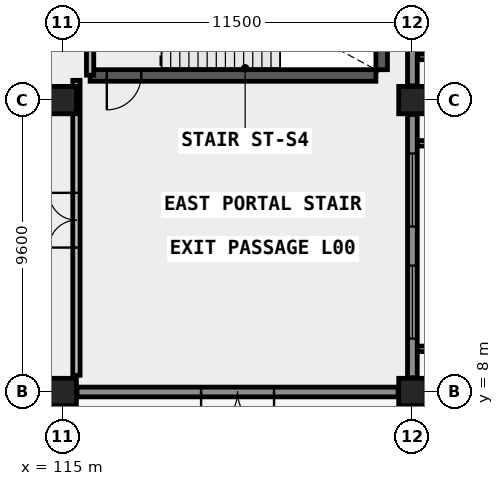
"""IFC4 building model, lengths in metres.
Left out: names, types, materials, properties, quantities, classifications, styles, units other than length and angle.
Written with IfcOpenShell. Run it as: python <this file> out.ifc"""

import sys

from ifc_helpers import new_model, si_unit, direction, frame, frame_2d, origin, origin_2d, place, context, subcontext, project, spatial, rectangle, circle, extrude, element, fill, save


model = new_model("IFC4")
c1 = context("Model", 3, precision=1e-05, world=origin(), true_north=direction((0.0, 1.0)))
c2 = subcontext(c1, "Body", "Model", "MODEL_VIEW")
j1 = project(units=[si_unit("LENGTHUNIT", "METRE"), si_unit("PLANEANGLEUNIT", "RADIAN")], contexts=[c1])
p1 = place(None, origin())
s1 = spatial("IfcSite", under=j1, at=p1, CompositionType="ELEMENT")
p2 = place(p1, origin())
s2 = spatial("IfcBuilding", under=s1, at=p2, CompositionType="ELEMENT")
p3 = place(p2, origin())
s3 = spatial("IfcBuildingStorey", under=s2, at=p3, CompositionType="ELEMENT", Elevation=0.0)
for number, where, z_axis, x_axis in (
    (1, (115.0, 8.0, 0.0), (0.0, 0.0, 1.0), (1.0, 0.0, 0.0)),
    (2, (115.0, 17.6, 0.0), (0.0, 0.0, 1.0), (1.0, 0.0, 0.0)),
    (3, (126.5, 8.0, 0.0), (0.0, 0.0, 1.0), (1.0, 0.0, 0.0)),
    (4, (126.5, 17.6, 0.0), (0.0, 0.0, 1.0), (1.0, 0.0, 0.0)),
):
    element("IfcColumn", number, at=place(p3, frame(where, z_axis=z_axis, x_axis=x_axis)), inside=s3, PredefinedType="COLUMN", context=c2, shape_type="SweptSolid", body=[
        extrude(circle(Radius=0.45, at=origin_2d()), origin(), (0.0, 0.0, 1.0), 4.2),
    ])
p4 = place(p3, frame((115.9, 18.41, 0.0), z_axis=(0.0, 0.0, 1.0), x_axis=(1.0, 0.0, 0.0)))
e5 = element("IfcWall", 5, at=p4, inside=s3, PredefinedType="SHEAR", context=c2, shape_type="SweptSolid", body=[
    extrude(rectangle(XDim=9.4, YDim=0.38, at=frame_2d((4.7, 0.0))), origin(), (0.0, 0.0, 1.0), 4.2),
])
p5 = place(p4, frame((0.55, 0.0, 0.0)))
e6 = element("IfcOpeningElement", 6, at=p5, cuts=e5, PredefinedType="OPENING", context=c2, shape_type="SweptSolid", body=[
    extrude(rectangle(XDim=1.13, YDim=2.15, at=frame_2d((0.565, 1.075))), frame((0.0, 0.2, 0.0), z_axis=(0.0, -1.0, 0.0), x_axis=(1.0, 0.0, 0.0)), (0.0, 0.0, 1.0), 0.4),
])
p6 = place(p3, frame((125.49, 18.6, 0.0), z_axis=(0.0, 0.0, 1.0), x_axis=(0.0, 1.0, 0.0)))
e7 = element("IfcWall", 7, at=p6, inside=s3, PredefinedType="SHEAR", context=c2, shape_type="SweptSolid", body=[
    extrude(rectangle(XDim=3.8, YDim=0.38, at=frame_2d((1.9, 0.0))), origin(), (0.0, 0.0, 1.0), 4.2),
])
p7 = place(p3, frame((115.47, 8.0, 0.0), z_axis=(0.0, 0.0, 1.0), x_axis=(1.0, 0.0, 0.0)))
e8 = element("IfcWall", 8, at=p7, inside=s3, PredefinedType="SOLIDWALL", context=c2, shape_type="SweptSolid", body=[
    extrude(rectangle(XDim=10.56, YDim=0.32, at=frame_2d((5.28, 0.0))), origin(), (0.0, 0.0, 1.0), 3.0),
])
p8 = place(p7, frame((4.08, 0.0, 0.0)))
e9 = element("IfcOpeningElement", 9, at=p8, cuts=e8, PredefinedType="OPENING", context=c2, shape_type="SweptSolid", body=[
    extrude(rectangle(XDim=2.4, YDim=2.6, at=frame_2d((1.2, 1.3))), frame((0.0, 0.17, 0.0), z_axis=(0.0, -1.0, 0.0), x_axis=(1.0, 0.0, 0.0)), (0.0, 0.0, 1.0), 0.34),
])
p9 = place(p3, frame((126.5, 8.47, 0.0), z_axis=(0.0, 0.0, 1.0), x_axis=(0.0, 1.0, 0.0)))
e10 = element("IfcWall", 10, at=p9, inside=s3, PredefinedType="SOLIDWALL", context=c2, shape_type="SweptSolid", body=[
    extrude(rectangle(XDim=8.66, YDim=0.32, at=frame_2d((4.33, 0.0))), origin(), (0.0, 0.0, 1.0), 3.0),
])
p10 = place(p9, frame((1.287, 0.0, 0.84)))
e11 = element("IfcOpeningElement", 11, at=p10, cuts=e10, PredefinedType="OPENING", context=c2, shape_type="SweptSolid", body=[
    extrude(rectangle(XDim=2.4, YDim=2.1, at=frame_2d((1.2, 1.05))), frame((0.0, 0.17, 0.0), z_axis=(0.0, -1.0, 0.0), x_axis=(1.0, 0.0, 0.0)), (0.0, 0.0, 1.0), 0.34),
])
p11 = place(p9, frame((4.973, 0.0, 0.84)))
e12 = element("IfcOpeningElement", 12, at=p11, cuts=e10, PredefinedType="OPENING", context=c2, shape_type="SweptSolid", body=[
    extrude(rectangle(XDim=2.4, YDim=2.1, at=frame_2d((1.2, 1.05))), frame((0.0, 0.17, 0.0), z_axis=(0.0, -1.0, 0.0), x_axis=(1.0, 0.0, 0.0)), (0.0, 0.0, 1.0), 0.34),
])
p12 = place(p3, frame((126.5, 18.07, 0.0), z_axis=(0.0, 0.0, 1.0), x_axis=(0.0, 1.0, 0.0)))
e13 = element("IfcWall", 13, at=p12, inside=s3, PredefinedType="SOLIDWALL", context=c2, shape_type="SweptSolid", body=[
    extrude(rectangle(XDim=8.66, YDim=0.32, at=frame_2d((4.33, 0.0))), origin(), (0.0, 0.0, 1.0), 3.0),
])
p13 = place(p12, frame((1.287, 0.0, 0.84)))
e14 = element("IfcOpeningElement", 14, at=p13, cuts=e13, PredefinedType="OPENING", context=c2, shape_type="SweptSolid", body=[
    extrude(rectangle(XDim=2.4, YDim=2.1, at=frame_2d((1.2, 1.05))), frame((0.0, 0.17, 0.0), z_axis=(0.0, -1.0, 0.0), x_axis=(1.0, 0.0, 0.0)), (0.0, 0.0, 1.0), 0.34),
])
p14 = place(p12, frame((4.973, 0.0, 0.84)))
e15 = element("IfcOpeningElement", 15, at=p14, cuts=e13, PredefinedType="OPENING", context=c2, shape_type="SweptSolid", body=[
    extrude(rectangle(XDim=2.4, YDim=2.1, at=frame_2d((1.2, 1.05))), frame((0.0, 0.17, 0.0), z_axis=(0.0, -1.0, 0.0), x_axis=(1.0, 0.0, 0.0)), (0.0, 0.0, 1.0), 0.34),
])
p15 = place(p3, frame((115.9, 18.42, 0.0), z_axis=(0.0, 0.0, 1.0), x_axis=(0.0, 1.0, 0.0)))
e16 = element("IfcWall", 16, at=p15, inside=s3, PredefinedType="SOLIDWALL", context=c2, shape_type="SweptSolid", body=[
    extrude(rectangle(XDim=4.16, YDim=0.24, at=frame_2d((2.08, 0.0))), origin(), (0.0, 0.0, 1.0), 3.88),
])
p16 = place(p15, frame((1.3, 0.0, 0.0)))
e17 = element("IfcOpeningElement", 17, at=p16, cuts=e16, PredefinedType="OPENING", context=c2, shape_type="SweptSolid", body=[
    extrude(rectangle(XDim=1.13, YDim=2.15, at=frame_2d((0.565, 1.075))), frame((0.0, 0.13, 0.0), z_axis=(0.0, -1.0, 0.0), x_axis=(1.0, 0.0, 0.0)), (0.0, 0.0, 1.0), 0.26),
])
p17 = place(p3, frame((115.45, 8.55, 0.0), z_axis=(0.0, 0.0, 1.0), x_axis=(0.0, 1.0, 0.0)))
e18 = element("IfcWall", 18, at=p17, inside=s3, PredefinedType="SOLIDWALL", context=c2, shape_type="SweptSolid", body=[
    extrude(rectangle(XDim=9.7, YDim=0.24, at=frame_2d((4.85, 0.0))), origin(), (0.0, 0.0, 1.0), 3.88),
])
p18 = place(p17, frame((4.2, 0.0, 0.0)))
e19 = element("IfcOpeningElement", 19, at=p18, cuts=e18, PredefinedType="OPENING", context=c2, shape_type="SweptSolid", body=[
    extrude(rectangle(XDim=1.8, YDim=2.2, at=frame_2d((0.9, 1.1))), frame((0.0, 0.13, 0.0), z_axis=(0.0, -1.0, 0.0), x_axis=(1.0, 0.0, 0.0)), (0.0, 0.0, 1.0), 0.26),
])
p19 = place(p8, frame((1.2, 0.0, 0.0), z_axis=(0.0, 0.0, 1.0), x_axis=(-1.0, 0.0, 0.0)))
e20 = element("IfcDoor", 20, at=p19, inside=s3, OperationType="DOUBLE_DOOR_SINGLE_SWING", PredefinedType="DOOR", context=c2, shape_type="SweptSolid", body=[
    extrude(rectangle(XDim=2.4, YDim=2.6, at=frame_2d((0.0, 1.3))), frame((0.0, 0.025, 0.0), z_axis=(0.0, -1.0, 0.0), x_axis=(1.0, 0.0, 0.0)), (0.0, 0.0, 1.0), 0.05),
])
fill(e9, e20)
p20 = place(p10, origin())
e21 = element("IfcWindow", 21, at=p20, inside=s3, PartitioningType="SINGLE_PANEL", PredefinedType="WINDOW", context=c2, shape_type="SweptSolid", body=[
    extrude(rectangle(XDim=2.4, YDim=2.1, at=frame_2d((1.2, 1.05))), frame((0.0, 0.03, 0.0), z_axis=(0.0, -1.0, 0.0), x_axis=(1.0, 0.0, 0.0)), (0.0, 0.0, 1.0), 0.06),
])
fill(e11, e21)
p21 = place(p11, origin())
e22 = element("IfcWindow", 22, at=p21, inside=s3, PartitioningType="SINGLE_PANEL", PredefinedType="WINDOW", context=c2, shape_type="SweptSolid", body=[
    extrude(rectangle(XDim=2.4, YDim=2.1, at=frame_2d((1.2, 1.05))), frame((0.0, 0.03, 0.0), z_axis=(0.0, -1.0, 0.0), x_axis=(1.0, 0.0, 0.0)), (0.0, 0.0, 1.0), 0.06),
])
fill(e12, e22)
p22 = place(p5, frame((0.565, 0.0, 0.0), z_axis=(0.0, 0.0, 1.0), x_axis=(-1.0, 0.0, 0.0)))
e23 = element("IfcDoor", 23, at=p22, inside=s3, OperationType="SINGLE_SWING_LEFT", PredefinedType="DOOR", context=c2, shape_type="SweptSolid", body=[
    extrude(rectangle(XDim=1.13, YDim=2.15, at=frame_2d((0.0, 1.075))), frame((0.0, 0.025, 0.0), z_axis=(0.0, -1.0, 0.0), x_axis=(1.0, 0.0, 0.0)), (0.0, 0.0, 1.0), 0.05),
])
fill(e6, e23)
p23 = place(p18, origin())
e24 = element("IfcDoor", 24, at=p23, inside=s3, OperationType="DOUBLE_DOOR_SINGLE_SWING", PredefinedType="DOOR", context=c2, shape_type="SweptSolid", body=[
    extrude(rectangle(XDim=1.8, YDim=2.2, at=frame_2d((0.9, 1.1))), frame((0.0, 0.025, 0.0), z_axis=(0.0, -1.0, 0.0), x_axis=(1.0, 0.0, 0.0)), (0.0, 0.0, 1.0), 0.05),
])
fill(e19, e24)
save(model, sys.argv[1])
